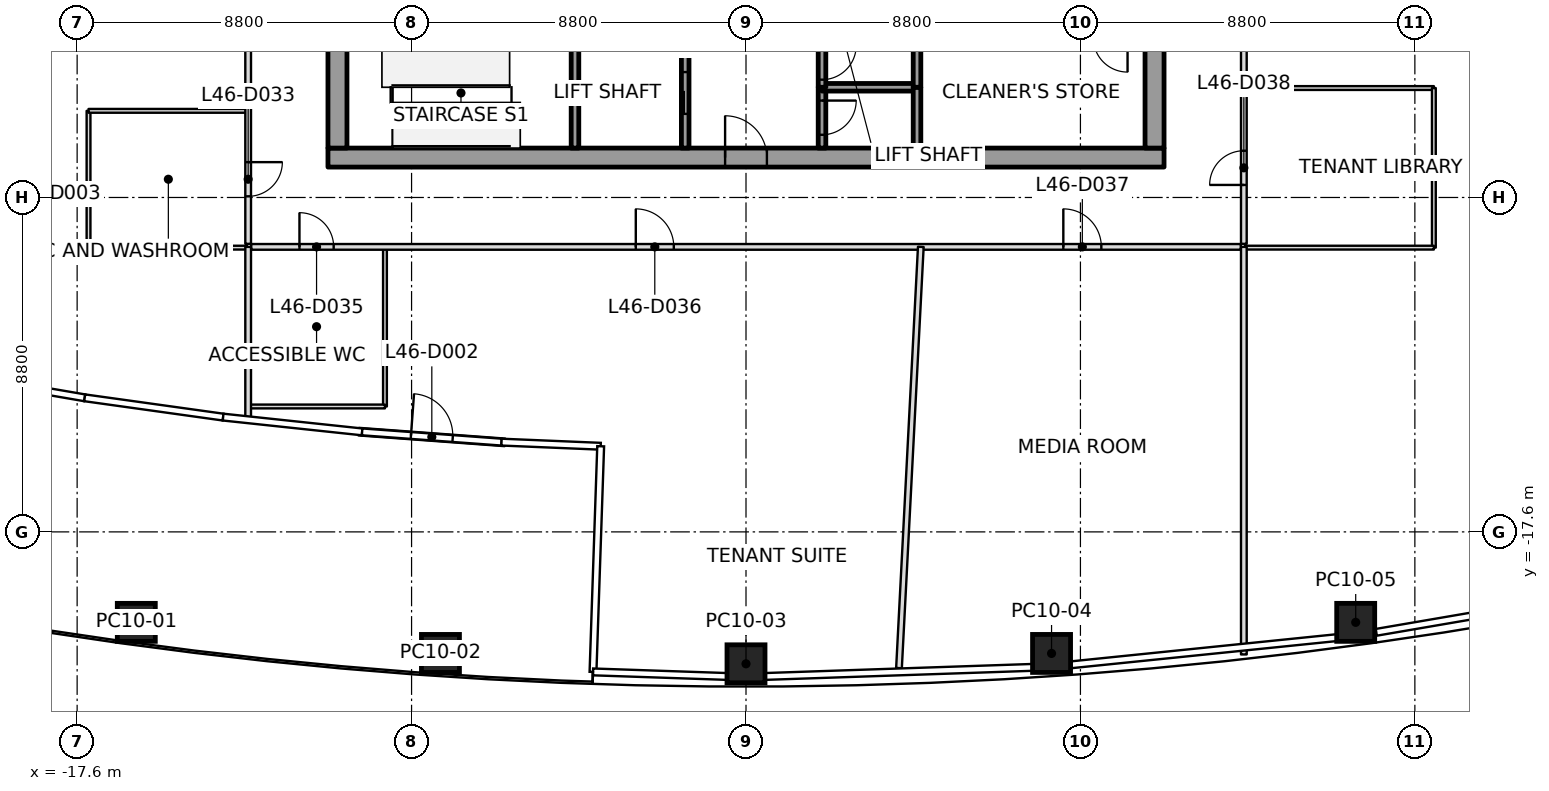
"""IFC4 building model, lengths in metres.
Left out: names, types, materials, properties, quantities, classifications, styles, units other than length and angle.
Written with IfcOpenShell. Run it as: python <this file> out.ifc"""

import sys

from ifc_helpers import new_model, si_unit, direction, frame, frame_2d, origin, origin_2d, place, context, subcontext, project, spatial, rectangle, extrude, element, fill, save


model = new_model("IFC4")
c1 = context("Model", 3, precision=1e-05, world=origin(), true_north=direction((0.0, 1.0)))
c2 = subcontext(c1, "Body", "Model", "MODEL_VIEW")
j1 = project(units=[si_unit("LENGTHUNIT", "METRE"), si_unit("PLANEANGLEUNIT", "RADIAN")], contexts=[c1])
p1 = place(None, origin())
s1 = spatial("IfcSite", under=j1, at=p1, CompositionType="ELEMENT")
p2 = place(p1, origin())
s2 = spatial("IfcBuilding", under=s1, at=p2, CompositionType="ELEMENT")
p3 = place(p2, frame((0.0, 0.0, 205.8)))
s3 = spatial("IfcBuildingStorey", under=s2, at=p3, CompositionType="ELEMENT", Elevation=205.8)
p4 = place(p3, frame((-16.043, -19.98, 0.0), z_axis=(0.017574453011, 0.010434831475, 0.999791104628), x_axis=(-0.990640715354, 0.135554456771, 0.015998822871)))
e1 = element("IfcColumn", 1, at=p4, inside=s3, PredefinedType="COLUMN", context=c2, shape_type="SweptSolid", body=[
    extrude(rectangle(XDim=1.0, YDim=1.0, at=origin_2d()), origin(), (0.0, 0.0, 1.0), 4.001),
])
p5 = place(p3, frame((-8.04, -20.798, 0.0), z_axis=(0.008849199152, 0.01116829962, 0.999898475225), x_axis=(-0.997656714611, 0.067940759705, 0.008070499548)))
e2 = element("IfcColumn", 2, at=p5, inside=s3, PredefinedType="COLUMN", context=c2, shape_type="SweptSolid", body=[
    extrude(rectangle(XDim=1.0, YDim=1.0, at=origin_2d()), origin(), (0.0, 0.0, 1.0), 4.0),
])
p6 = place(p3, frame((0.0, -21.071, 0.0), z_axis=(0.0, 0.01141283087, 0.999934871525), x_axis=(1.0, 0.0, 0.0)))
e3 = element("IfcColumn", 3, at=p6, inside=s3, PredefinedType="COLUMN", context=c2, shape_type="SweptSolid", body=[
    extrude(rectangle(XDim=1.0, YDim=1.0, at=origin_2d()), origin(), (0.0, 0.0, 1.0), 4.0),
])
p7 = place(p3, frame((8.04, -20.798, 0.0), z_axis=(-0.008849199152, 0.01116829962, 0.999898475225), x_axis=(0.997656714611, 0.067940759705, 0.008070499548)))
e4 = element("IfcColumn", 4, at=p7, inside=s3, PredefinedType="COLUMN", context=c2, shape_type="SweptSolid", body=[
    extrude(rectangle(XDim=1.0, YDim=1.0, at=origin_2d()), origin(), (0.0, 0.0, 1.0), 4.0),
])
p8 = place(p3, frame((16.043, -19.98, 0.0), z_axis=(-0.017574453011, 0.010434831475, 0.999791104628), x_axis=(0.990640715354, 0.135554456771, 0.015998822871)))
e5 = element("IfcColumn", 5, at=p8, inside=s3, PredefinedType="COLUMN", context=c2, shape_type="SweptSolid", body=[
    extrude(rectangle(XDim=1.0, YDim=1.0, at=origin_2d()), origin(), (0.0, 0.0, 1.0), 4.001),
])
p9 = place(p3, frame((-11.0, -7.75, 0.0), z_axis=(0.0, 0.0, 1.0), x_axis=(1.0, 0.0, 0.0)))
e6 = element("IfcWall", 6, at=p9, inside=s3, PredefinedType="SHEAR", context=c2, shape_type="SweptSolid", body=[
    extrude(rectangle(XDim=22.0, YDim=0.5, at=frame_2d((11.0, 0.0))), origin(), (0.0, 0.0, 1.0), 4.0),
])
p10 = place(p9, frame((10.45, 0.0, 0.0)))
e7 = element("IfcOpeningElement", 7, at=p10, cuts=e6, PredefinedType="OPENING", context=c2, shape_type="SweptSolid", body=[
    extrude(rectangle(XDim=1.1, YDim=2.1, at=frame_2d((0.55, 1.05))), frame((0.0, 0.25, 0.0), z_axis=(0.0, -1.0, 0.0), x_axis=(1.0, 0.0, 0.0)), (0.0, 0.0, 1.0), 0.5),
])
p11 = place(p3, frame((-10.75, -7.5, 0.0), z_axis=(0.0, 0.0, 1.0), x_axis=(0.0, 1.0, 0.0)))
e8 = element("IfcWall", 8, at=p11, inside=s3, PredefinedType="SHEAR", context=c2, shape_type="SweptSolid", body=[
    extrude(rectangle(XDim=15.0, YDim=0.5, at=frame_2d((7.5, 0.0))), origin(), (0.0, 0.0, 1.0), 4.0),
])
p12 = place(p11, frame((6.6, 0.0, 0.0)))
e9 = element("IfcOpeningElement", 9, at=p12, cuts=e8, PredefinedType="OPENING", context=c2, shape_type="SweptSolid", body=[
    extrude(rectangle(XDim=1.8, YDim=2.1, at=frame_2d((0.9, 1.05))), frame((0.0, 0.25, 0.0), z_axis=(0.0, -1.0, 0.0), x_axis=(1.0, 0.0, 0.0)), (0.0, 0.0, 1.0), 0.5),
])
p13 = place(p3, frame((10.75, -7.5, 0.0), z_axis=(0.0, 0.0, 1.0), x_axis=(0.0, 1.0, 0.0)))
e10 = element("IfcWall", 10, at=p13, inside=s3, PredefinedType="SHEAR", context=c2, shape_type="SweptSolid", body=[
    extrude(rectangle(XDim=15.0, YDim=0.5, at=frame_2d((7.5, 0.0))), origin(), (0.0, 0.0, 1.0), 4.0),
])
p14 = place(p13, frame((6.6, 0.0, 0.0)))
e11 = element("IfcOpeningElement", 11, at=p14, cuts=e10, PredefinedType="OPENING", context=c2, shape_type="SweptSolid", body=[
    extrude(rectangle(XDim=1.8, YDim=2.1, at=frame_2d((0.9, 1.05))), frame((0.0, 0.25, 0.0), z_axis=(0.0, -1.0, 0.0), x_axis=(1.0, 0.0, 0.0)), (0.0, 0.0, 1.0), 0.5),
])
p15 = place(p3, frame((-10.191, -14.962, 0.0), z_axis=(0.0, 0.0, 1.0), x_axis=(0.997311095397, -0.073284234309, 0.0)))
e12 = element("IfcWall", 12, at=p15, inside=s3, PredefinedType="SOLIDWALL", context=c2, shape_type="SweptSolid", body=[
    extrude(rectangle(XDim=3.858, YDim=0.2, at=frame_2d((1.929, 0.0))), origin(), (0.0, 0.0, 1.0), 3.34),
])
p16 = place(p15, frame((1.379, 0.0, 0.0)))
e13 = element("IfcOpeningElement", 13, at=p16, cuts=e12, PredefinedType="OPENING", context=c2, shape_type="SweptSolid", body=[
    extrude(rectangle(XDim=1.1, YDim=2.1, at=frame_2d((0.55, 1.05))), frame((0.0, 0.1, 0.0), z_axis=(0.0, -1.0, 0.0), x_axis=(1.0, 0.0, 0.0)), (0.0, 0.0, 1.0), 0.2),
])
p17 = place(p3, frame((-4.5, -4.6, 0.0), z_axis=(0.0, 0.0, 1.0), x_axis=(0.0, -1.0, 0.0)))
e14 = element("IfcWall", 14, at=p17, inside=s3, PredefinedType="SOLIDWALL", context=c2, shape_type="SweptSolid", body=[
    extrude(rectangle(XDim=2.9, YDim=0.2, at=frame_2d((1.45, 0.0))), origin(), (0.0, 0.0, 1.0), 3.85),
])
p18 = place(p3, frame((-1.6, -7.5, 0.0), z_axis=(0.0, 0.0, 1.0), x_axis=(0.0, 1.0, 0.0)))
e15 = element("IfcWall", 15, at=p18, inside=s3, PredefinedType="SOLIDWALL", context=c2, shape_type="SweptSolid", body=[
    extrude(rectangle(XDim=2.9, YDim=0.2, at=frame_2d((1.45, 0.0))), origin(), (0.0, 0.0, 1.0), 3.85),
])
p19 = place(p18, frame((0.9, 0.0, 0.0)))
e16 = element("IfcOpeningElement", 16, at=p19, cuts=e15, PredefinedType="OPENING", context=c2, shape_type="SweptSolid", body=[
    extrude(rectangle(XDim=1.1, YDim=2.1, at=frame_2d((0.55, 1.05))), frame((0.0, 0.1, 0.0), z_axis=(0.0, -1.0, 0.0), x_axis=(1.0, 0.0, 0.0)), (0.0, 0.0, 1.0), 0.2),
])
p20 = place(p3, frame((2.0, -5.9, 0.0), z_axis=(0.0, 0.0, 1.0), x_axis=(0.0, -1.0, 0.0)))
e17 = element("IfcWall", 17, at=p20, inside=s3, PredefinedType="SOLIDWALL", context=c2, shape_type="SweptSolid", body=[
    extrude(rectangle(XDim=1.6, YDim=0.2, at=frame_2d((0.8, 0.0))), origin(), (0.0, 0.0, 1.0), 3.85),
])
p21 = place(p20, frame((0.35, 0.0, 0.0)))
e18 = element("IfcOpeningElement", 18, at=p21, cuts=e17, PredefinedType="OPENING", context=c2, shape_type="SweptSolid", body=[
    extrude(rectangle(XDim=0.9, YDim=2.1, at=frame_2d((0.45, 1.05))), frame((0.0, 0.1, 0.0), z_axis=(0.0, -1.0, 0.0), x_axis=(1.0, 0.0, 0.0)), (0.0, 0.0, 1.0), 0.2),
])
p22 = place(p3, frame((4.5, -5.9, 0.0), z_axis=(0.0, 0.0, 1.0), x_axis=(-1.0, 0.0, 0.0)))
e19 = element("IfcWall", 19, at=p22, inside=s3, PredefinedType="SOLIDWALL", context=c2, shape_type="SweptSolid", body=[
    extrude(rectangle(XDim=2.5, YDim=0.2, at=frame_2d((1.25, 0.0))), origin(), (0.0, 0.0, 1.0), 3.85),
])
p23 = place(p3, frame((2.0, -4.6, 0.0), z_axis=(0.0, 0.0, 1.0), x_axis=(0.0, -1.0, 0.0)))
e20 = element("IfcWall", 20, at=p23, inside=s3, PredefinedType="SOLIDWALL", context=c2, shape_type="SweptSolid", body=[
    extrude(rectangle(XDim=1.3, YDim=0.2, at=frame_2d((0.65, 0.0))), origin(), (0.0, 0.0, 1.0), 3.85),
])
p24 = place(p23, frame((0.2, 0.0, 0.0)))
e21 = element("IfcOpeningElement", 21, at=p24, cuts=e20, PredefinedType="OPENING", context=c2, shape_type="SweptSolid", body=[
    extrude(rectangle(XDim=0.9, YDim=2.1, at=frame_2d((0.45, 1.05))), frame((0.0, 0.1, 0.0), z_axis=(0.0, -1.0, 0.0), x_axis=(1.0, 0.0, 0.0)), (0.0, 0.0, 1.0), 0.2),
])
p25 = place(p3, frame((4.5, -5.9, 0.0), z_axis=(0.0, 0.0, 1.0), x_axis=(0.0, -1.0, 0.0)))
e22 = element("IfcWall", 22, at=p25, inside=s3, PredefinedType="SOLIDWALL", context=c2, shape_type="SweptSolid", body=[
    extrude(rectangle(XDim=1.6, YDim=0.2, at=frame_2d((0.8, 0.0))), origin(), (0.0, 0.0, 1.0), 3.85),
])
p26 = place(p3, frame((4.5, -4.6, 0.0), z_axis=(0.0, 0.0, 1.0), x_axis=(0.0, -1.0, 0.0)))
e23 = element("IfcWall", 23, at=p26, inside=s3, PredefinedType="SOLIDWALL", context=c2, shape_type="SweptSolid", body=[
    extrude(rectangle(XDim=1.3, YDim=0.2, at=frame_2d((0.65, 0.0))), origin(), (0.0, 0.0, 1.0), 3.85),
])
p27 = place(p3, frame((-13.1, -10.1, 0.0), z_axis=(0.0, 0.0, 1.0), x_axis=(0.0, -1.0, 0.0)))
e24 = element("IfcWall", 24, at=p27, inside=s3, PredefinedType="PARTITIONING", context=c2, shape_type="SweptSolid", body=[
    extrude(rectangle(XDim=4.555, YDim=0.15, at=frame_2d((2.277, 0.0))), origin(), (0.0, 0.0, 1.0), 3.45),
])
p28 = place(p3, frame((4.6, -10.1, 0.0), z_axis=(0.0, 0.0, 1.0), x_axis=(-0.051755313509, -0.998659795688, 0.0)))
e25 = element("IfcWall", 25, at=p28, inside=s3, PredefinedType="PARTITIONING", context=c2, shape_type="SweptSolid", body=[
    extrude(rectangle(XDim=11.1, YDim=0.15, at=frame_2d((5.55, 0.0))), origin(), (0.0, 0.0, 1.0), 3.234),
])
p29 = place(p3, frame((13.1, -10.1, 0.0), z_axis=(0.0, 0.0, 1.0), x_axis=(0.0, -1.0, 0.0)))
e26 = element("IfcWall", 26, at=p29, inside=s3, PredefinedType="PARTITIONING", context=c2, shape_type="SweptSolid", body=[
    extrude(rectangle(XDim=10.725, YDim=0.15, at=frame_2d((5.362, 0.0))), origin(), (0.0, 0.0, 1.0), 3.234),
])
p30 = place(p3, frame((-13.1, 8.145, 0.0), z_axis=(0.0, 0.0, 1.0), x_axis=(0.0, -1.0, 0.0)))
e27 = element("IfcWall", 27, at=p30, inside=s3, PredefinedType="PARTITIONING", context=c2, shape_type="SweptSolid", body=[
    extrude(rectangle(XDim=18.165, YDim=0.15, at=frame_2d((9.083, 0.0))), origin(), (0.0, 0.0, 1.0), 3.166),
])
p31 = place(p30, frame((16.015, 0.0, 0.0)))
e28 = element("IfcOpeningElement", 28, at=p31, cuts=e27, PredefinedType="OPENING", context=c2, shape_type="SweptSolid", body=[
    extrude(rectangle(XDim=0.9, YDim=2.1, at=frame_2d((0.45, 1.05))), frame((0.0, 0.075, 0.0), z_axis=(0.0, -1.0, 0.0), x_axis=(1.0, 0.0, 0.0)), (0.0, 0.0, 1.0), 0.15),
])
p32 = place(p30, frame((6.783, 0.0, 0.0)))
e29 = element("IfcOpeningElement", 29, at=p32, cuts=e27, PredefinedType="OPENING", context=c2, shape_type="SweptSolid", body=[
    extrude(rectangle(XDim=1.0, YDim=2.1, at=frame_2d((0.5, 1.05))), frame((0.0, 0.075, 0.0), z_axis=(0.0, -1.0, 0.0), x_axis=(1.0, 0.0, 0.0)), (0.0, 0.0, 1.0), 0.15),
])
p33 = place(p3, frame((-13.02, -10.1, 0.0), z_axis=(0.0, 0.0, 1.0), x_axis=(1.0, 0.0, 0.0)))
e30 = element("IfcWall", 30, at=p33, inside=s3, PredefinedType="PARTITIONING", context=c2, shape_type="SweptSolid", body=[
    extrude(rectangle(XDim=26.04, YDim=0.15, at=frame_2d((13.02, 0.0))), origin(), (0.0, 0.0, 1.0), 3.317),
])
p34 = place(p33, frame((1.27, 0.0, 0.0)))
e31 = element("IfcOpeningElement", 31, at=p34, cuts=e30, PredefinedType="OPENING", context=c2, shape_type="SweptSolid", body=[
    extrude(rectangle(XDim=0.9, YDim=2.1, at=frame_2d((0.45, 1.05))), frame((0.0, 0.075, 0.0), z_axis=(0.0, -1.0, 0.0), x_axis=(1.0, 0.0, 0.0)), (0.0, 0.0, 1.0), 0.15),
])
p35 = place(p33, frame((10.12, 0.0, 0.0)))
e32 = element("IfcOpeningElement", 32, at=p35, cuts=e30, PredefinedType="OPENING", context=c2, shape_type="SweptSolid", body=[
    extrude(rectangle(XDim=1.0, YDim=2.1, at=frame_2d((0.5, 1.05))), frame((0.0, 0.075, 0.0), z_axis=(0.0, -1.0, 0.0), x_axis=(1.0, 0.0, 0.0)), (0.0, 0.0, 1.0), 0.15),
])
p36 = place(p33, frame((21.37, 0.0, 0.0)))
e33 = element("IfcOpeningElement", 33, at=p36, cuts=e30, PredefinedType="OPENING", context=c2, shape_type="SweptSolid", body=[
    extrude(rectangle(XDim=1.0, YDim=2.1, at=frame_2d((0.5, 1.05))), frame((0.0, 0.075, 0.0), z_axis=(0.0, -1.0, 0.0), x_axis=(1.0, 0.0, 0.0)), (0.0, 0.0, 1.0), 0.15),
])
p37 = place(p3, frame((13.1, -10.02, 0.0), z_axis=(0.0, 0.0, 1.0), x_axis=(0.0, 1.0, 0.0)))
e34 = element("IfcWall", 34, at=p37, inside=s3, PredefinedType="PARTITIONING", context=c2, shape_type="SweptSolid", body=[
    extrude(rectangle(XDim=20.04, YDim=0.15, at=frame_2d((10.02, 0.0))), origin(), (0.0, 0.0, 1.0), 3.166),
])
p38 = place(p37, frame((15.37, 0.0, 0.0)))
e35 = element("IfcOpeningElement", 35, at=p38, cuts=e34, PredefinedType="OPENING", context=c2, shape_type="SweptSolid", body=[
    extrude(rectangle(XDim=1.0, YDim=2.1, at=frame_2d((0.5, 1.05))), frame((0.0, 0.075, 0.0), z_axis=(0.0, -1.0, 0.0), x_axis=(1.0, 0.0, 0.0)), (0.0, 0.0, 1.0), 0.15),
])
p39 = place(p37, frame((1.55, 0.0, 0.0)))
e36 = element("IfcOpeningElement", 36, at=p39, cuts=e34, PredefinedType="OPENING", context=c2, shape_type="SweptSolid", body=[
    extrude(rectangle(XDim=0.9, YDim=2.1, at=frame_2d((0.45, 1.05))), frame((0.0, 0.075, 0.0), z_axis=(0.0, -1.0, 0.0), x_axis=(1.0, 0.0, 0.0)), (0.0, 0.0, 1.0), 0.15),
])
p40 = place(p37, frame((7.41, 0.0, 0.0)))
e37 = element("IfcOpeningElement", 37, at=p40, cuts=e34, PredefinedType="OPENING", context=c2, shape_type="SweptSolid", body=[
    extrude(rectangle(XDim=1.0, YDim=2.1, at=frame_2d((0.5, 1.05))), frame((0.0, 0.075, 0.0), z_axis=(0.0, -1.0, 0.0), x_axis=(1.0, 0.0, 0.0)), (0.0, 0.0, 1.0), 0.15),
])
p41 = place(p3, frame((-13.13, -10.12, 0.0), z_axis=(0.0, 0.0, 1.0), x_axis=(-1.0, 0.0, 0.0)))
e38 = element("IfcWall", 38, at=p41, inside=s3, PredefinedType="PARTITIONING", context=c2, shape_type="SweptSolid", body=[
    extrude(rectangle(XDim=4.17, YDim=0.1, at=frame_2d((2.085, 0.0))), origin(), (0.0, 0.0, 1.0), 3.166),
])
p42 = place(p3, frame((-17.3, -10.12, 0.0), z_axis=(0.0, 0.0, 1.0), x_axis=(0.0, 1.0, 0.0)))
e39 = element("IfcWall", 39, at=p42, inside=s3, PredefinedType="PARTITIONING", context=c2, shape_type="SweptSolid", body=[
    extrude(rectangle(XDim=3.6, YDim=0.1, at=frame_2d((1.8, 0.0))), origin(), (0.0, 0.0, 1.0), 3.317),
])
for number, where, z_axis, x_axis in (
    (40, (-17.3, -6.52, 0.0), (0.0, 0.0, 1.0), (1.0, 0.0, 0.0)),
    (41, (-9.5, -10.13, 0.0), (0.0, 0.0, 1.0), (0.0, -1.0, 0.0)),
):
    element("IfcWall", number, at=place(p3, frame(where, z_axis=z_axis, x_axis=x_axis)), inside=s3, PredefinedType="PARTITIONING", context=c2, shape_type="SweptSolid", body=[
        extrude(rectangle(XDim=4.17, YDim=0.1, at=frame_2d((2.085, 0.0))), origin(), (0.0, 0.0, 1.0), 3.45),
    ])
p43 = place(p3, frame((-9.5, -14.3, 0.0), z_axis=(0.0, 0.0, 1.0), x_axis=(-1.0, 0.0, 0.0)))
e42 = element("IfcWall", 42, at=p43, inside=s3, PredefinedType="PARTITIONING", context=c2, shape_type="SweptSolid", body=[
    extrude(rectangle(XDim=3.57, YDim=0.1, at=frame_2d((1.785, 0.0))), origin(), (0.0, 0.0, 1.0), 3.393),
])
p44 = place(p3, frame((13.13, -5.92, 0.0), z_axis=(0.0, 0.0, 1.0), x_axis=(1.0, 0.0, 0.0)))
e43 = element("IfcWall", 43, at=p44, inside=s3, PredefinedType="PARTITIONING", context=c2, shape_type="SweptSolid", body=[
    extrude(rectangle(XDim=4.97, YDim=0.1, at=frame_2d((2.485, 0.0))), origin(), (0.0, 0.0, 1.0), 3.45),
])
p45 = place(p3, frame((18.1, -5.92, 0.0), z_axis=(0.0, 0.0, 1.0), x_axis=(0.0, -1.0, 0.0)))
e44 = element("IfcWall", 44, at=p45, inside=s3, PredefinedType="PARTITIONING", context=c2, shape_type="SweptSolid", body=[
    extrude(rectangle(XDim=4.2, YDim=0.1, at=frame_2d((2.1, 0.0))), origin(), (0.0, 0.0, 1.0), 3.317),
])
p46 = place(p3, frame((18.1, -10.12, 0.0), z_axis=(0.0, 0.0, 1.0), x_axis=(-1.0, 0.0, 0.0)))
e45 = element("IfcWall", 45, at=p46, inside=s3, PredefinedType="PARTITIONING", context=c2, shape_type="SweptSolid", body=[
    extrude(rectangle(XDim=4.97, YDim=0.1, at=frame_2d((2.485, 0.0))), origin(), (0.0, 0.0, 1.0), 3.166),
])
p47 = place(p16, origin())
e46 = element("IfcDoor", 46, at=p47, inside=s3, OperationType="SINGLE_SWING_LEFT", PredefinedType="DOOR", context=c2, shape_type="SweptSolid", body=[
    extrude(rectangle(XDim=1.1, YDim=2.1, at=frame_2d((0.55, 1.05))), frame((0.0, 0.025, 0.0), z_axis=(0.0, -1.0, 0.0), x_axis=(1.0, 0.0, 0.0)), (0.0, 0.0, 1.0), 0.05),
])
fill(e13, e46)
p48 = place(p31, origin())
e47 = element("IfcDoor", 47, at=p48, inside=s3, OperationType="SINGLE_SWING_LEFT", PredefinedType="DOOR", context=c2, shape_type="SweptSolid", body=[
    extrude(rectangle(XDim=0.9, YDim=2.1, at=frame_2d((0.45, 1.05))), frame((0.0, 0.025, 0.0), z_axis=(0.0, -1.0, 0.0), x_axis=(1.0, 0.0, 0.0)), (0.0, 0.0, 1.0), 0.05),
])
fill(e28, e47)
p49 = place(p34, origin())
e48 = element("IfcDoor", 48, at=p49, inside=s3, OperationType="SINGLE_SWING_RIGHT", PredefinedType="DOOR", context=c2, shape_type="SweptSolid", body=[
    extrude(rectangle(XDim=0.9, YDim=2.1, at=frame_2d((0.45, 1.05))), frame((0.0, 0.025, 0.0), z_axis=(0.0, -1.0, 0.0), x_axis=(1.0, 0.0, 0.0)), (0.0, 0.0, 1.0), 0.05),
])
fill(e31, e48)
p50 = place(p35, origin())
e49 = element("IfcDoor", 49, at=p50, inside=s3, OperationType="SINGLE_SWING_RIGHT", PredefinedType="DOOR", context=c2, shape_type="SweptSolid", body=[
    extrude(rectangle(XDim=1.0, YDim=2.1, at=frame_2d((0.5, 1.05))), frame((0.0, 0.025, 0.0), z_axis=(0.0, -1.0, 0.0), x_axis=(1.0, 0.0, 0.0)), (0.0, 0.0, 1.0), 0.05),
])
fill(e32, e49)
p51 = place(p36, origin())
e50 = element("IfcDoor", 50, at=p51, inside=s3, OperationType="SINGLE_SWING_RIGHT", PredefinedType="DOOR", context=c2, shape_type="SweptSolid", body=[
    extrude(rectangle(XDim=1.0, YDim=2.1, at=frame_2d((0.5, 1.05))), frame((0.0, 0.025, 0.0), z_axis=(0.0, -1.0, 0.0), x_axis=(1.0, 0.0, 0.0)), (0.0, 0.0, 1.0), 0.05),
])
fill(e33, e50)
p52 = place(p39, origin())
e51 = element("IfcDoor", 51, at=p52, inside=s3, OperationType="SINGLE_SWING_LEFT", PredefinedType="DOOR", context=c2, shape_type="SweptSolid", body=[
    extrude(rectangle(XDim=0.9, YDim=2.1, at=frame_2d((0.45, 1.05))), frame((0.0, 0.025, 0.0), z_axis=(0.0, -1.0, 0.0), x_axis=(1.0, 0.0, 0.0)), (0.0, 0.0, 1.0), 0.05),
])
fill(e36, e51)
p53 = place(p19, origin())
e52 = element("IfcDoor", 52, at=p53, inside=s3, OperationType="SLIDING_TO_LEFT", PredefinedType="DOOR", context=c2, shape_type="SweptSolid", body=[
    extrude(rectangle(XDim=1.1, YDim=2.1, at=frame_2d((0.55, 1.05))), frame((0.0, 0.025, 0.0), z_axis=(0.0, -1.0, 0.0), x_axis=(1.0, 0.0, 0.0)), (0.0, 0.0, 1.0), 0.05),
])
fill(e16, e52)
p54 = place(p21, origin())
e53 = element("IfcDoor", 53, at=p54, inside=s3, OperationType="SINGLE_SWING_LEFT", PredefinedType="DOOR", context=c2, shape_type="SweptSolid", body=[
    extrude(rectangle(XDim=0.9, YDim=2.1, at=frame_2d((0.45, 1.05))), frame((0.0, 0.025, 0.0), z_axis=(0.0, -1.0, 0.0), x_axis=(1.0, 0.0, 0.0)), (0.0, 0.0, 1.0), 0.05),
])
fill(e18, e53)
p55 = place(p24, origin())
e54 = element("IfcDoor", 54, at=p55, inside=s3, OperationType="SINGLE_SWING_LEFT", PredefinedType="DOOR", context=c2, shape_type="SweptSolid", body=[
    extrude(rectangle(XDim=0.9, YDim=2.1, at=frame_2d((0.45, 1.05))), frame((0.0, 0.025, 0.0), z_axis=(0.0, -1.0, 0.0), x_axis=(1.0, 0.0, 0.0)), (0.0, 0.0, 1.0), 0.05),
])
fill(e21, e54)
p56 = place(p10, origin())
e55 = element("IfcDoor", 55, at=p56, inside=s3, OperationType="SINGLE_SWING_RIGHT", PredefinedType="DOOR", context=c2, shape_type="SweptSolid", body=[
    extrude(rectangle(XDim=1.1, YDim=2.1, at=frame_2d((0.55, 1.05))), frame((0.0, 0.025, 0.0), z_axis=(0.0, -1.0, 0.0), x_axis=(1.0, 0.0, 0.0)), (0.0, 0.0, 1.0), 0.05),
])
fill(e7, e55)
save(model, sys.argv[1])
